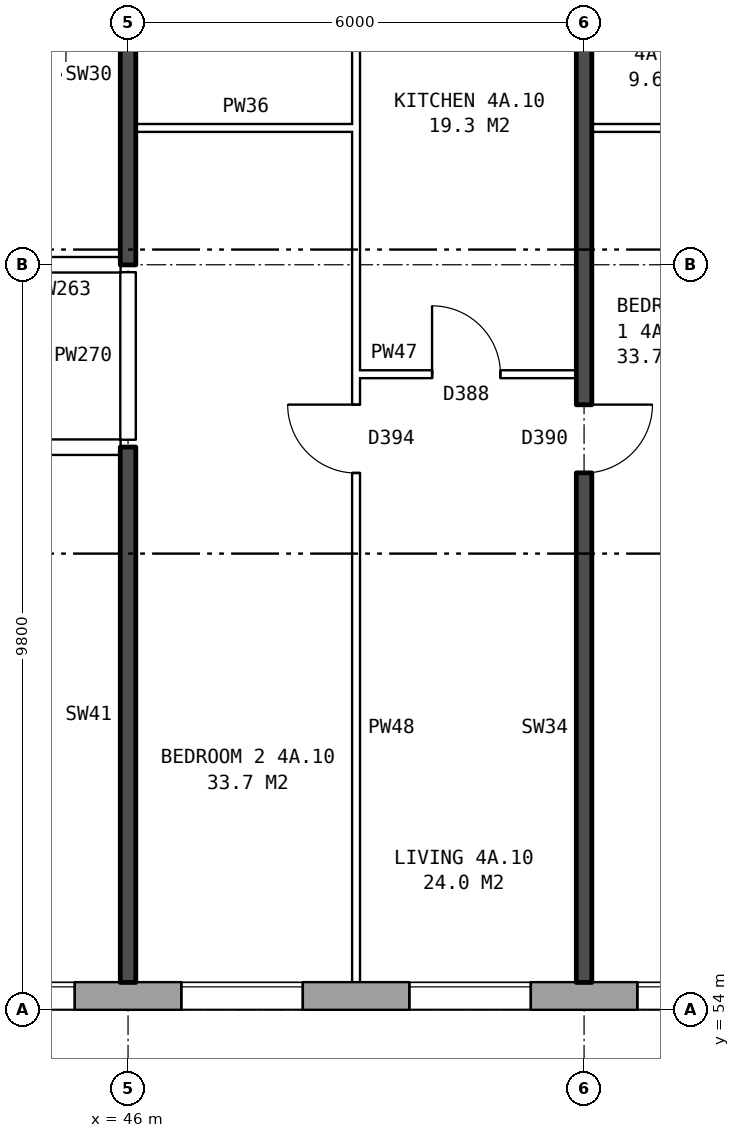
"""IFC4 building model, lengths in metres.
Left out: names, types, materials, properties, quantities, classifications, styles, units other than length and angle.
Written with IfcOpenShell. Run it as: python <this file> out.ifc"""

import sys

from ifc_helpers import new_model, si_unit, direction, frame, frame_2d, origin, place, context, subcontext, project, spatial, rectangle, extrude, element, fill, save


model = new_model("IFC4")
c1 = context("Model", 3, precision=1e-05, world=origin(), true_north=direction((0.0, 1.0)))
c2 = subcontext(c1, "Body", "Model", "MODEL_VIEW")
j1 = project(units=[si_unit("LENGTHUNIT", "METRE"), si_unit("PLANEANGLEUNIT", "RADIAN")], contexts=[c1])
p1 = place(None, origin())
s1 = spatial("IfcSite", under=j1, at=p1, CompositionType="ELEMENT")
p2 = place(p1, origin())
s2 = spatial("IfcBuilding", under=s1, at=p2, CompositionType="ELEMENT")
p3 = place(p2, frame((0.0, 0.0, 19.5)))
s3 = spatial("IfcBuildingStorey", under=s2, at=p3, CompositionType="ELEMENT", Elevation=19.5)
p4 = place(p3, frame((22.825, 54.18, 0.0), z_axis=(0.0, 0.0, 1.0), x_axis=(1.0, 0.0, 0.0)))
e1 = element("IfcWall", 1, at=p4, inside=s3, PredefinedType="STANDARD", context=c2, shape_type="SweptSolid", body=[
    extrude(rectangle(XDim=50.101, YDim=0.36, at=frame_2d((25.05, 0.0))), origin(), (0.0, 0.0, 1.0), 2.85),
])
p5 = place(p4, frame((2.875, 0.0, 0.8)))
e2 = element("IfcOpeningElement", 2, at=p5, cuts=e1, PredefinedType="OPENING", context=c2, shape_type="SweptSolid", body=[
    extrude(rectangle(XDim=1.6, YDim=1.8, at=frame_2d((0.8, 0.9))), frame((0.0, 0.19, 0.0), z_axis=(0.0, -1.0, 0.0), x_axis=(1.0, 0.0, 0.0)), (0.0, 0.0, 1.0), 0.38),
])
p6 = place(p4, frame((5.875, 0.0, 0.8)))
e3 = element("IfcOpeningElement", 3, at=p6, cuts=e1, PredefinedType="OPENING", context=c2, shape_type="SweptSolid", body=[
    extrude(rectangle(XDim=1.6, YDim=1.8, at=frame_2d((0.8, 0.9))), frame((0.0, 0.19, 0.0), z_axis=(0.0, -1.0, 0.0), x_axis=(1.0, 0.0, 0.0)), (0.0, 0.0, 1.0), 0.38),
])
p7 = place(p4, frame((8.875, 0.0, 0.8)))
e4 = element("IfcOpeningElement", 4, at=p7, cuts=e1, PredefinedType="OPENING", context=c2, shape_type="SweptSolid", body=[
    extrude(rectangle(XDim=1.6, YDim=1.8, at=frame_2d((0.8, 0.9))), frame((0.0, 0.19, 0.0), z_axis=(0.0, -1.0, 0.0), x_axis=(1.0, 0.0, 0.0)), (0.0, 0.0, 1.0), 0.38),
])
p8 = place(p4, frame((11.875, 0.0, 0.8)))
e5 = element("IfcOpeningElement", 5, at=p8, cuts=e1, PredefinedType="OPENING", context=c2, shape_type="SweptSolid", body=[
    extrude(rectangle(XDim=1.6, YDim=1.8, at=frame_2d((0.8, 0.9))), frame((0.0, 0.19, 0.0), z_axis=(0.0, -1.0, 0.0), x_axis=(1.0, 0.0, 0.0)), (0.0, 0.0, 1.0), 0.38),
])
p9 = place(p4, frame((14.875, 0.0, 0.8)))
e6 = element("IfcOpeningElement", 6, at=p9, cuts=e1, PredefinedType="OPENING", context=c2, shape_type="SweptSolid", body=[
    extrude(rectangle(XDim=1.6, YDim=1.8, at=frame_2d((0.8, 0.9))), frame((0.0, 0.19, 0.0), z_axis=(0.0, -1.0, 0.0), x_axis=(1.0, 0.0, 0.0)), (0.0, 0.0, 1.0), 0.38),
])
p10 = place(p4, frame((17.875, 0.0, 0.8)))
e7 = element("IfcOpeningElement", 7, at=p10, cuts=e1, PredefinedType="OPENING", context=c2, shape_type="SweptSolid", body=[
    extrude(rectangle(XDim=1.6, YDim=1.8, at=frame_2d((0.8, 0.9))), frame((0.0, 0.19, 0.0), z_axis=(0.0, -1.0, 0.0), x_axis=(1.0, 0.0, 0.0)), (0.0, 0.0, 1.0), 0.38),
])
p11 = place(p4, frame((20.875, 0.0, 0.8)))
e8 = element("IfcOpeningElement", 8, at=p11, cuts=e1, PredefinedType="OPENING", context=c2, shape_type="SweptSolid", body=[
    extrude(rectangle(XDim=1.6, YDim=1.8, at=frame_2d((0.8, 0.9))), frame((0.0, 0.19, 0.0), z_axis=(0.0, -1.0, 0.0), x_axis=(1.0, 0.0, 0.0)), (0.0, 0.0, 1.0), 0.38),
])
p12 = place(p4, frame((23.875, 0.0, 0.8)))
e9 = element("IfcOpeningElement", 9, at=p12, cuts=e1, PredefinedType="OPENING", context=c2, shape_type="SweptSolid", body=[
    extrude(rectangle(XDim=1.6, YDim=1.8, at=frame_2d((0.8, 0.9))), frame((0.0, 0.19, 0.0), z_axis=(0.0, -1.0, 0.0), x_axis=(1.0, 0.0, 0.0)), (0.0, 0.0, 1.0), 0.38),
])
p13 = place(p4, frame((26.875, 0.0, 0.8)))
e10 = element("IfcOpeningElement", 10, at=p13, cuts=e1, PredefinedType="OPENING", context=c2, shape_type="SweptSolid", body=[
    extrude(rectangle(XDim=1.6, YDim=1.8, at=frame_2d((0.8, 0.9))), frame((0.0, 0.19, 0.0), z_axis=(0.0, -1.0, 0.0), x_axis=(1.0, 0.0, 0.0)), (0.0, 0.0, 1.0), 0.38),
])
p14 = place(p4, frame((29.875, 0.0, 0.8)))
e11 = element("IfcOpeningElement", 11, at=p14, cuts=e1, PredefinedType="OPENING", context=c2, shape_type="SweptSolid", body=[
    extrude(rectangle(XDim=1.6, YDim=1.8, at=frame_2d((0.8, 0.9))), frame((0.0, 0.19, 0.0), z_axis=(0.0, -1.0, 0.0), x_axis=(1.0, 0.0, 0.0)), (0.0, 0.0, 1.0), 0.38),
])
p15 = place(p4, frame((32.875, 0.0, 0.8)))
e12 = element("IfcOpeningElement", 12, at=p15, cuts=e1, PredefinedType="OPENING", context=c2, shape_type="SweptSolid", body=[
    extrude(rectangle(XDim=1.6, YDim=1.8, at=frame_2d((0.8, 0.9))), frame((0.0, 0.19, 0.0), z_axis=(0.0, -1.0, 0.0), x_axis=(1.0, 0.0, 0.0)), (0.0, 0.0, 1.0), 0.38),
])
p16 = place(p4, frame((35.875, 0.0, 0.8)))
e13 = element("IfcOpeningElement", 13, at=p16, cuts=e1, PredefinedType="OPENING", context=c2, shape_type="SweptSolid", body=[
    extrude(rectangle(XDim=1.6, YDim=1.8, at=frame_2d((0.8, 0.9))), frame((0.0, 0.19, 0.0), z_axis=(0.0, -1.0, 0.0), x_axis=(1.0, 0.0, 0.0)), (0.0, 0.0, 1.0), 0.38),
])
p17 = place(p4, frame((38.875, 0.0, 0.8)))
e14 = element("IfcOpeningElement", 14, at=p17, cuts=e1, PredefinedType="OPENING", context=c2, shape_type="SweptSolid", body=[
    extrude(rectangle(XDim=1.6, YDim=1.8, at=frame_2d((0.8, 0.9))), frame((0.0, 0.19, 0.0), z_axis=(0.0, -1.0, 0.0), x_axis=(1.0, 0.0, 0.0)), (0.0, 0.0, 1.0), 0.38),
])
p18 = place(p4, frame((41.875, 0.0, 0.8)))
e15 = element("IfcOpeningElement", 15, at=p18, cuts=e1, PredefinedType="OPENING", context=c2, shape_type="SweptSolid", body=[
    extrude(rectangle(XDim=1.6, YDim=1.8, at=frame_2d((0.8, 0.9))), frame((0.0, 0.19, 0.0), z_axis=(0.0, -1.0, 0.0), x_axis=(1.0, 0.0, 0.0)), (0.0, 0.0, 1.0), 0.38),
])
p19 = place(p4, frame((44.875, 0.0, 0.8)))
e16 = element("IfcOpeningElement", 16, at=p19, cuts=e1, PredefinedType="OPENING", context=c2, shape_type="SweptSolid", body=[
    extrude(rectangle(XDim=1.6, YDim=1.8, at=frame_2d((0.8, 0.9))), frame((0.0, 0.19, 0.0), z_axis=(0.0, -1.0, 0.0), x_axis=(1.0, 0.0, 0.0)), (0.0, 0.0, 1.0), 0.38),
])
p20 = place(p4, frame((47.375, 0.0, 0.8)))
e17 = element("IfcOpeningElement", 17, at=p20, cuts=e1, PredefinedType="OPENING", context=c2, shape_type="SweptSolid", body=[
    extrude(rectangle(XDim=1.0, YDim=1.5, at=frame_2d((0.5, 0.75))), frame((0.0, 0.19, 0.0), z_axis=(0.0, -1.0, 0.0), x_axis=(1.0, 0.0, 0.0)), (0.0, 0.0, 1.0), 0.38),
])
p21 = place(p4, frame((48.675, 0.0, 0.8)))
e18 = element("IfcOpeningElement", 18, at=p21, cuts=e1, PredefinedType="OPENING", context=c2, shape_type="SweptSolid", body=[
    extrude(rectangle(XDim=0.6, YDim=0.9, at=frame_2d((0.3, 0.45))), frame((0.0, 0.19, 0.0), z_axis=(0.0, -1.0, 0.0), x_axis=(1.0, 0.0, 0.0)), (0.0, 0.0, 1.0), 0.38),
])
p22 = place(p3, frame((20.11, 61.4, 0.0), z_axis=(0.0, 0.0, 1.0), x_axis=(1.0, 0.0, 0.0)))
e19 = element("IfcWall", 19, at=p22, inside=s3, PredefinedType="PARTITIONING", context=c2, shape_type="SweptSolid", body=[
    extrude(rectangle(XDim=25.79, YDim=0.2, at=frame_2d((12.895, 0.0))), origin(), (0.0, 0.0, 1.0), 2.85),
])
p23 = place(p22, frame((22.34, 0.0, 0.0)))
e20 = element("IfcOpeningElement", 20, at=p23, cuts=e19, PredefinedType="OPENING", context=c2, shape_type="SweptSolid", body=[
    extrude(rectangle(XDim=1.0, YDim=2.1, at=frame_2d((0.5, 1.05))), frame((0.0, 0.11, 0.0), z_axis=(0.0, -1.0, 0.0), x_axis=(1.0, 0.0, 0.0)), (0.0, 0.0, 1.0), 0.22),
])
p24 = place(p22, frame((10.39, 0.0, 0.0)))
e21 = element("IfcOpeningElement", 21, at=p24, cuts=e19, PredefinedType="OPENING", context=c2, shape_type="SweptSolid", body=[
    extrude(rectangle(XDim=1.0, YDim=2.1, at=frame_2d((0.5, 1.05))), frame((0.0, 0.11, 0.0), z_axis=(0.0, -1.0, 0.0), x_axis=(1.0, 0.0, 0.0)), (0.0, 0.0, 1.0), 0.22),
])
p25 = place(p22, frame((2.245, 0.0, 0.0)))
e22 = element("IfcOpeningElement", 22, at=p25, cuts=e19, PredefinedType="OPENING", context=c2, shape_type="SweptSolid", body=[
    extrude(rectangle(XDim=1.0, YDim=2.1, at=frame_2d((0.5, 1.05))), frame((0.0, 0.11, 0.0), z_axis=(0.0, -1.0, 0.0), x_axis=(1.0, 0.0, 0.0)), (0.0, 0.0, 1.0), 0.22),
])
p26 = place(p3, frame((49.0, 62.36, 0.0), z_axis=(0.0, 0.0, 1.0), x_axis=(1.0, 0.0, 0.0)))
e23 = element("IfcWall", 23, at=p26, inside=s3, PredefinedType="PARTITIONING", context=c2, shape_type="SweptSolid", body=[
    extrude(rectangle(XDim=2.9, YDim=0.1, at=frame_2d((1.45, 0.0))), origin(), (0.0, 0.0, 1.0), 2.85),
])
p27 = place(p26, frame((1.0, 0.0, 0.0)))
e24 = element("IfcOpeningElement", 24, at=p27, cuts=e23, PredefinedType="OPENING", context=c2, shape_type="SweptSolid", body=[
    extrude(rectangle(XDim=0.9, YDim=2.1, at=frame_2d((0.45, 1.05))), frame((0.0, 0.06, 0.0), z_axis=(0.0, -1.0, 0.0), x_axis=(1.0, 0.0, 0.0)), (0.0, 0.0, 1.0), 0.12),
])
p28 = place(p3, frame((44.36, 63.8, 0.0), z_axis=(0.0, 0.0, 1.0), x_axis=(1.0, 0.0, 0.0)))
e25 = element("IfcWall", 25, at=p28, inside=s3, PredefinedType="PARTITIONING", context=c2, shape_type="SweptSolid", body=[
    extrude(rectangle(XDim=1.54, YDim=0.2, at=frame_2d((0.77, 0.0))), origin(), (0.0, 0.0, 1.0), 2.85),
])
p29 = place(p3, frame((46.1, 65.6, 0.0), z_axis=(0.0, 0.0, 1.0), x_axis=(1.0, 0.0, 0.0)))
e26 = element("IfcWall", 26, at=p29, inside=s3, PredefinedType="PARTITIONING", context=c2, shape_type="SweptSolid", body=[
    extrude(rectangle(XDim=2.9, YDim=0.1, at=frame_2d((1.45, 0.0))), origin(), (0.0, 0.0, 1.0), 2.85),
])
p30 = place(p3, frame((52.1, 65.6, 0.0), z_axis=(0.0, 0.0, 1.0), x_axis=(1.0, 0.0, 0.0)))
e27 = element("IfcWall", 27, at=p30, inside=s3, PredefinedType="PARTITIONING", context=c2, shape_type="SweptSolid", body=[
    extrude(rectangle(XDim=2.8, YDim=0.1, at=frame_2d((1.4, 0.0))), origin(), (0.0, 0.0, 1.0), 2.85),
])
p31 = place(p3, frame((46.0, 54.36, 0.0), z_axis=(0.0, 0.0, 1.0), x_axis=(0.0, 1.0, 0.0)))
e28 = element("IfcWall", 28, at=p31, inside=s3, PredefinedType="SOLIDWALL", context=c2, shape_type="SweptSolid", body=[
    extrude(rectangle(XDim=7.04, YDim=0.2, at=frame_2d((3.52, 0.0))), origin(), (0.0, 0.0, 1.0), 2.85),
])
p32 = place(p3, frame((46.0, 61.5, 0.0), z_axis=(0.0, 0.0, 1.0), x_axis=(0.0, 1.0, 0.0)))
e29 = element("IfcWall", 29, at=p32, inside=s3, PredefinedType="PARTITIONING", context=c2, shape_type="SweptSolid", body=[
    extrude(rectangle(XDim=2.2, YDim=0.2, at=frame_2d((1.1, 0.0))), origin(), (0.0, 0.0, 1.0), 2.85),
])
p33 = place(p3, frame((46.0, 63.8, 0.0), z_axis=(0.0, 0.0, 1.0), x_axis=(0.0, 1.0, 0.0)))
e30 = element("IfcWall", 30, at=p33, inside=s3, PredefinedType="SOLIDWALL", context=c2, shape_type="SweptSolid", body=[
    extrude(rectangle(XDim=5.0, YDim=0.2, at=frame_2d((2.5, 0.0))), origin(), (0.0, 0.0, 1.0), 2.85),
])
p34 = place(p3, frame((49.0, 54.36, 0.0), z_axis=(0.0, 0.0, 1.0), x_axis=(0.0, 1.0, 0.0)))
e31 = element("IfcWall", 31, at=p34, inside=s3, PredefinedType="PARTITIONING", context=c2, shape_type="SweptSolid", body=[
    extrude(rectangle(XDim=14.34, YDim=0.1, at=frame_2d((7.17, 0.0))), origin(), (0.0, 0.0, 1.0), 2.85),
])
p35 = place(p34, frame((6.7, 0.0, 0.0)))
e32 = element("IfcOpeningElement", 32, at=p35, cuts=e31, PredefinedType="OPENING", context=c2, shape_type="SweptSolid", body=[
    extrude(rectangle(XDim=0.9, YDim=2.1, at=frame_2d((0.45, 1.05))), frame((0.0, 0.06, 0.0), z_axis=(0.0, -1.0, 0.0), x_axis=(1.0, 0.0, 0.0)), (0.0, 0.0, 1.0), 0.12),
])
p36 = place(p34, frame((13.04, 0.0, 0.0)))
e33 = element("IfcOpeningElement", 33, at=p36, cuts=e31, PredefinedType="OPENING", context=c2, shape_type="SweptSolid", body=[
    extrude(rectangle(XDim=0.9, YDim=2.1, at=frame_2d((0.45, 1.05))), frame((0.0, 0.06, 0.0), z_axis=(0.0, -1.0, 0.0), x_axis=(1.0, 0.0, 0.0)), (0.0, 0.0, 1.0), 0.12),
])
p37 = place(p3, frame((52.0, 54.36, 0.0), z_axis=(0.0, 0.0, 1.0), x_axis=(0.0, 1.0, 0.0)))
e34 = element("IfcWall", 34, at=p37, inside=s3, PredefinedType="SOLIDWALL", context=c2, shape_type="SweptSolid", body=[
    extrude(rectangle(XDim=14.44, YDim=0.2, at=frame_2d((7.22, 0.0))), origin(), (0.0, 0.0, 1.0), 2.85),
])
p38 = place(p37, frame((6.7, 0.0, 0.0)))
e35 = element("IfcOpeningElement", 35, at=p38, cuts=e34, PredefinedType="OPENING", context=c2, shape_type="SweptSolid", body=[
    extrude(rectangle(XDim=0.9, YDim=2.1, at=frame_2d((0.45, 1.05))), frame((0.0, 0.11, 0.0), z_axis=(0.0, -1.0, 0.0), x_axis=(1.0, 0.0, 0.0)), (0.0, 0.0, 1.0), 0.22),
])
p39 = place(p37, frame((13.14, 0.0, 0.0)))
e36 = element("IfcOpeningElement", 36, at=p39, cuts=e34, PredefinedType="OPENING", context=c2, shape_type="SweptSolid", body=[
    extrude(rectangle(XDim=0.9, YDim=2.1, at=frame_2d((0.45, 1.05))), frame((0.0, 0.11, 0.0), z_axis=(0.0, -1.0, 0.0), x_axis=(1.0, 0.0, 0.0)), (0.0, 0.0, 1.0), 0.22),
])
p40 = place(p11, origin())
e37 = element("IfcWindow", 37, at=p40, inside=s3, PartitioningType="SINGLE_PANEL", PredefinedType="WINDOW", context=c2, shape_type="SweptSolid", body=[
    extrude(rectangle(XDim=1.6, YDim=1.8, at=frame_2d((0.8, 0.9))), frame((0.0, 0.15, 0.0), z_axis=(0.0, -1.0, 0.0), x_axis=(1.0, 0.0, 0.0)), (0.0, 0.0, 1.0), 0.06),
])
fill(e8, e37)
p41 = place(p12, origin())
e38 = element("IfcWindow", 38, at=p41, inside=s3, PartitioningType="SINGLE_PANEL", PredefinedType="WINDOW", context=c2, shape_type="SweptSolid", body=[
    extrude(rectangle(XDim=1.6, YDim=1.8, at=frame_2d((0.8, 0.9))), frame((0.0, 0.15, 0.0), z_axis=(0.0, -1.0, 0.0), x_axis=(1.0, 0.0, 0.0)), (0.0, 0.0, 1.0), 0.06),
])
fill(e9, e38)
p42 = place(p13, origin())
e39 = element("IfcWindow", 39, at=p42, inside=s3, PartitioningType="SINGLE_PANEL", PredefinedType="WINDOW", context=c2, shape_type="SweptSolid", body=[
    extrude(rectangle(XDim=1.6, YDim=1.8, at=frame_2d((0.8, 0.9))), frame((0.0, 0.15, 0.0), z_axis=(0.0, -1.0, 0.0), x_axis=(1.0, 0.0, 0.0)), (0.0, 0.0, 1.0), 0.06),
])
fill(e10, e39)
p43 = place(p14, origin())
e40 = element("IfcWindow", 40, at=p43, inside=s3, PartitioningType="SINGLE_PANEL", PredefinedType="WINDOW", context=c2, shape_type="SweptSolid", body=[
    extrude(rectangle(XDim=1.6, YDim=1.8, at=frame_2d((0.8, 0.9))), frame((0.0, 0.15, 0.0), z_axis=(0.0, -1.0, 0.0), x_axis=(1.0, 0.0, 0.0)), (0.0, 0.0, 1.0), 0.06),
])
fill(e11, e40)
p44 = place(p38, frame((0.9, 0.0, 0.0), z_axis=(0.0, 0.0, 1.0), x_axis=(-1.0, 0.0, 0.0)))
e41 = element("IfcDoor", 41, at=p44, inside=s3, OperationType="SINGLE_SWING_LEFT", PredefinedType="DOOR", context=c2, shape_type="SweptSolid", body=[
    extrude(rectangle(XDim=0.9, YDim=2.1, at=frame_2d((0.45, 1.05))), frame((0.0, 0.025, 0.0), z_axis=(0.0, -1.0, 0.0), x_axis=(1.0, 0.0, 0.0)), (0.0, 0.0, 1.0), 0.05),
])
fill(e35, e41)
p45 = place(p35, origin())
e42 = element("IfcDoor", 42, at=p45, inside=s3, OperationType="SINGLE_SWING_RIGHT", PredefinedType="DOOR", context=c2, shape_type="SweptSolid", body=[
    extrude(rectangle(XDim=0.9, YDim=2.1, at=frame_2d((0.45, 1.05))), frame((0.0, 0.025, 0.0), z_axis=(0.0, -1.0, 0.0), x_axis=(1.0, 0.0, 0.0)), (0.0, 0.0, 1.0), 0.05),
])
fill(e32, e42)
p46 = place(p27, origin())
e43 = element("IfcDoor", 43, at=p46, inside=s3, OperationType="SINGLE_SWING_LEFT", PredefinedType="DOOR", context=c2, shape_type="SweptSolid", body=[
    extrude(rectangle(XDim=0.9, YDim=2.1, at=frame_2d((0.45, 1.05))), frame((0.0, 0.025, 0.0), z_axis=(0.0, -1.0, 0.0), x_axis=(1.0, 0.0, 0.0)), (0.0, 0.0, 1.0), 0.05),
])
fill(e24, e43)
save(model, sys.argv[1])
